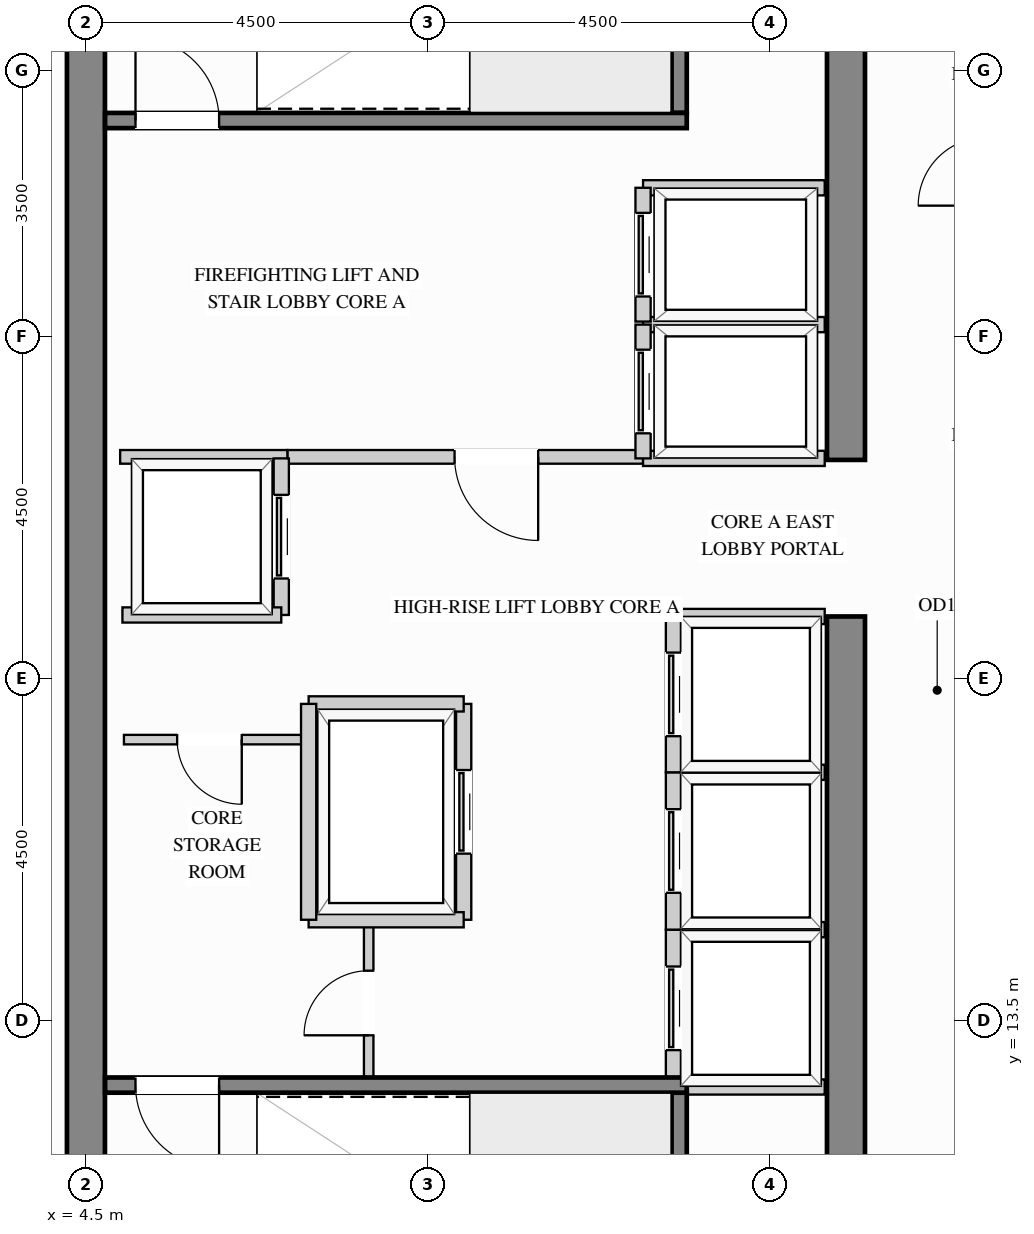
"""IFC4 building model, lengths in metres.
Left out: names, types, materials, properties, quantities, classifications, styles, units other than length and angle.
Written with IfcOpenShell. Run it as: python <this file> out.ifc"""

import sys

from ifc_helpers import new_model, si_unit, direction, frame, frame_2d, origin, place, context, subcontext, project, spatial, rectangle, extrude, source, transform, mapped, element, fill, save


model = new_model("IFC4")
c1 = context("Model", 3, precision=1e-05, world=origin(), true_north=direction((0.0, 1.0)))
c2 = subcontext(c1, "Body", "Model", "MODEL_VIEW")
j1 = project(units=[si_unit("LENGTHUNIT", "METRE"), si_unit("PLANEANGLEUNIT", "RADIAN")], contexts=[c1])
p1 = place(None, origin())
s1 = spatial("IfcSite", under=j1, at=p1, CompositionType="ELEMENT")
p2 = place(p1, origin())
s2 = spatial("IfcBuilding", under=s1, at=p2, CompositionType="ELEMENT")
p3 = place(p2, frame((0.0, 0.0, 270.0)))
s3 = spatial("IfcBuildingStorey", under=s2, at=p3, CompositionType="ELEMENT", Elevation=270.0)
m1 = source(origin(), c2, "Body", "SweptSolid", [
    extrude(rectangle(XDim=10.07, YDim=0.5, at=frame_2d((5.035, 0.0))), origin(), (0.0, 0.0, 1.0), 3.4),
])
p4 = place(p3, frame((14.5, 8.75, 0.0), z_axis=(0.0, 0.0, 1.0), x_axis=(0.0, 1.0, 0.0)))
e1 = element("IfcWall", 1, at=p4, inside=s3, PredefinedType="SHEAR", context=c2, shape_type="MappedRepresentation", body=[
    mapped(m1, transform((0.0, 0.0, 0.0), x_axis=(1.0, 0.0, 0.0), y_axis=(0.0, 1.0, 0.0), z_axis=(0.0, 0.0, 1.0))),
])
m2 = source(origin(), c2, "Body", "SweptSolid", [
    extrude(rectangle(XDim=8.37, YDim=0.5, at=frame_2d((4.185, 0.0))), origin(), (0.0, 0.0, 1.0), 3.4),
])
p5 = place(p3, frame((14.5, 20.88, 0.0), z_axis=(0.0, 0.0, 1.0), x_axis=(0.0, 1.0, 0.0)))
e2 = element("IfcWall", 2, at=p5, inside=s3, PredefinedType="SHEAR", context=c2, shape_type="MappedRepresentation", body=[
    mapped(m2, transform((0.0, 0.0, 0.0), x_axis=(1.0, 0.0, 0.0), y_axis=(0.0, 1.0, 0.0), z_axis=(0.0, 0.0, 1.0))),
])
m3 = source(origin(), c2, "Body", "SweptSolid", [
    extrude(rectangle(XDim=20.5, YDim=0.5, at=frame_2d((10.25, 0.0))), origin(), (0.0, 0.0, 1.0), 3.4),
])
p6 = place(p3, frame((4.5, 8.75, 0.0), z_axis=(0.0, 0.0, 1.0), x_axis=(0.0, 1.0, 0.0)))
e3 = element("IfcWall", 3, at=p6, inside=s3, PredefinedType="SHEAR", context=c2, shape_type="MappedRepresentation", body=[
    mapped(m3, transform((0.0, 0.0, 0.0), x_axis=(1.0, 0.0, 0.0), y_axis=(0.0, 1.0, 0.0), z_axis=(0.0, 0.0, 1.0))),
])
p7 = place(p3, frame((7.15, 20.92, 0.0), z_axis=(0.0, 0.0, 1.0), x_axis=(1.0, 0.0, 0.0)))
e4 = element("IfcWall", 4, at=p7, inside=s3, PredefinedType="PARTITIONING", context=c2, shape_type="SweptSolid", body=[
    extrude(rectangle(XDim=4.68, YDim=0.18, at=frame_2d((2.34, 0.0))), origin(), (0.0, 0.0, 1.0), 3.385),
])
p8 = place(p7, frame((2.2, 0.0, 0.0)))
e5 = element("IfcOpeningElement", 5, at=p8, cuts=e4, PredefinedType="OPENING", context=c2, shape_type="SweptSolid", body=[
    extrude(rectangle(XDim=1.1, YDim=2.15, at=frame_2d((0.55, 1.075))), frame((0.0, 0.1, 0.0), z_axis=(0.0, -1.0, 0.0), x_axis=(1.0, 0.0, 0.0)), (0.0, 0.0, 1.0), 0.2),
])
m4 = source(origin(), c2, "Body", "SweptSolid", [
    extrude(rectangle(XDim=2.2, YDim=0.18, at=frame_2d((1.1, 0.0))), origin(), (0.0, 0.0, 1.0), 3.385),
])
p9 = place(p3, frame((4.95, 20.92, 0.0), z_axis=(0.0, 0.0, 1.0), x_axis=(1.0, 0.0, 0.0)))
e6 = element("IfcWall", 6, at=p9, inside=s3, PredefinedType="PARTITIONING", context=c2, shape_type="MappedRepresentation", body=[
    mapped(m4, transform((0.0, 0.0, 0.0), x_axis=(1.0, 0.0, 0.0), y_axis=(0.0, 1.0, 0.0), z_axis=(0.0, 0.0, 1.0))),
])
p10 = place(p3, frame((8.22, 12.75, 0.0), z_axis=(0.0, 0.0, 1.0), x_axis=(0.0, 1.0, 0.0)))
e7 = element("IfcWall", 7, at=p10, inside=s3, PredefinedType="PARTITIONING", context=c2, shape_type="SweptSolid", body=[
    extrude(rectangle(XDim=2.07, YDim=0.125, at=frame_2d((1.035, 0.0))), origin(), (0.0, 0.0, 1.0), 3.385),
])
p11 = place(p10, frame((0.56, 0.0, 0.0)))
e8 = element("IfcOpeningElement", 8, at=p11, cuts=e7, PredefinedType="OPENING", context=c2, shape_type="SweptSolid", body=[
    extrude(rectangle(XDim=0.85, YDim=2.1, at=frame_2d((0.425, 1.05))), frame((0.0, 0.073, 0.0), z_axis=(0.0, -1.0, 0.0), x_axis=(1.0, 0.0, 0.0)), (0.0, 0.0, 1.0), 0.145),
])
p12 = place(p3, frame((5.0, 17.2, 0.0), z_axis=(0.0, 0.0, 1.0), x_axis=(1.0, 0.0, 0.0)))
e9 = element("IfcWall", 9, at=p12, inside=s3, PredefinedType="PARTITIONING", context=c2, shape_type="SweptSolid", body=[
    extrude(rectangle(XDim=2.4, YDim=0.125, at=frame_2d((1.2, 0.0))), origin(), (0.0, 0.0, 1.0), 3.385),
])
p13 = place(p12, frame((0.7, 0.0, 0.0)))
e10 = element("IfcOpeningElement", 10, at=p13, cuts=e9, PredefinedType="OPENING", context=c2, shape_type="SweptSolid", body=[
    extrude(rectangle(XDim=0.85, YDim=2.1, at=frame_2d((0.425, 1.05))), frame((0.0, 0.073, 0.0), z_axis=(0.0, -1.0, 0.0), x_axis=(1.0, 0.0, 0.0)), (0.0, 0.0, 1.0), 0.145),
])
m5 = source(origin(), c2, "Body", "SweptSolid", [
    extrude(rectangle(XDim=2.39, YDim=0.2, at=frame_2d((1.195, 0.0))), origin(), (0.0, 0.0, 1.0), 3.385),
])
for number, where, z_axis, x_axis in (
    (11, (11.83, 22.66, 0.0), (0.0, 0.0, 1.0), (1.0, 0.0, 0.0)),
    (12, (11.83, 20.9, 0.0), (0.0, 0.0, 1.0), (1.0, 0.0, 0.0)),
):
    element("IfcWall", number, at=place(p3, frame(where, z_axis=z_axis, x_axis=x_axis)), inside=s3, PredefinedType="PARTITIONING", context=c2, shape_type="MappedRepresentation", body=[
        mapped(m5, transform((0.0, 0.0, 0.0), x_axis=(1.0, 0.0, 0.0), y_axis=(0.0, 1.0, 0.0), z_axis=(0.0, 0.0, 1.0))),
    ])
p14 = place(p3, frame((11.83, 20.9, 0.0), z_axis=(0.0, 0.0, 1.0), x_axis=(0.0, 1.0, 0.0)))
e13 = element("IfcWall", 13, at=p14, inside=s3, PredefinedType="PARTITIONING", context=c2, shape_type="SweptSolid", body=[
    extrude(rectangle(XDim=1.76, YDim=0.2, at=frame_2d((0.88, 0.0))), origin(), (0.0, 0.0, 1.0), 3.385),
])
p15 = place(p14, frame((0.33, 0.0, 0.0)))
e14 = element("IfcOpeningElement", 14, at=p15, cuts=e13, PredefinedType="OPENING", context=c2, shape_type="SweptSolid", body=[
    extrude(rectangle(XDim=1.1, YDim=2.2, at=frame_2d((0.55, 1.1))), frame((0.0, 0.11, 0.0), z_axis=(0.0, -1.0, 0.0), x_axis=(1.0, 0.0, 0.0)), (0.0, 0.0, 1.0), 0.22),
])
p16 = place(p3, frame((11.83, 24.46, 0.0), z_axis=(0.0, 0.0, 1.0), x_axis=(1.0, 0.0, 0.0)))
e15 = element("IfcWall", 15, at=p16, inside=s3, PredefinedType="PARTITIONING", context=c2, shape_type="MappedRepresentation", body=[
    mapped(m5, transform((0.0, 0.0, 0.0), x_axis=(1.0, 0.0, 0.0), y_axis=(0.0, 1.0, 0.0), z_axis=(0.0, 0.0, 1.0))),
])
p17 = place(p3, frame((11.83, 22.7, 0.0), z_axis=(0.0, 0.0, 1.0), x_axis=(0.0, 1.0, 0.0)))
e16 = element("IfcWall", 16, at=p17, inside=s3, PredefinedType="PARTITIONING", context=c2, shape_type="SweptSolid", body=[
    extrude(rectangle(XDim=1.76, YDim=0.2, at=frame_2d((0.88, 0.0))), origin(), (0.0, 0.0, 1.0), 3.385),
])
p18 = place(p17, frame((0.33, 0.0, 0.0)))
e17 = element("IfcOpeningElement", 17, at=p18, cuts=e16, PredefinedType="OPENING", context=c2, shape_type="SweptSolid", body=[
    extrude(rectangle(XDim=1.1, YDim=2.2, at=frame_2d((0.55, 1.1))), frame((0.0, 0.11, 0.0), z_axis=(0.0, -1.0, 0.0), x_axis=(1.0, 0.0, 0.0)), (0.0, 0.0, 1.0), 0.22),
])
m6 = source(origin(), c2, "Body", "SweptSolid", [
    extrude(rectangle(XDim=1.99, YDim=0.2, at=frame_2d((0.995, 0.0))), origin(), (0.0, 0.0, 1.0), 3.385),
])
for number, where, z_axis, x_axis in (
    (18, (12.23, 14.7, 0.0), (0.0, 0.0, 1.0), (1.0, 0.0, 0.0)),
    (19, (12.23, 12.63, 0.0), (0.0, 0.0, 1.0), (1.0, 0.0, 0.0)),
):
    element("IfcWall", number, at=place(p3, frame(where, z_axis=z_axis, x_axis=x_axis)), inside=s3, PredefinedType="PARTITIONING", context=c2, shape_type="MappedRepresentation", body=[
        mapped(m6, transform((0.0, 0.0, 0.0), x_axis=(1.0, 0.0, 0.0), y_axis=(0.0, 1.0, 0.0), z_axis=(0.0, 0.0, 1.0))),
    ])
p19 = place(p3, frame((12.23, 12.63, 0.0), z_axis=(0.0, 0.0, 1.0), x_axis=(0.0, 1.0, 0.0)))
e20 = element("IfcWall", 20, at=p19, inside=s3, PredefinedType="PARTITIONING", context=c2, shape_type="SweptSolid", body=[
    extrude(rectangle(XDim=2.07, YDim=0.2, at=frame_2d((1.035, 0.0))), origin(), (0.0, 0.0, 1.0), 3.385),
])
p20 = place(p19, frame((0.485, 0.0, 0.0)))
e21 = element("IfcOpeningElement", 21, at=p20, cuts=e20, PredefinedType="OPENING", context=c2, shape_type="SweptSolid", body=[
    extrude(rectangle(XDim=1.1, YDim=2.2, at=frame_2d((0.55, 1.1))), frame((0.0, 0.11, 0.0), z_axis=(0.0, -1.0, 0.0), x_axis=(1.0, 0.0, 0.0)), (0.0, 0.0, 1.0), 0.22),
])
p21 = place(p3, frame((12.23, 16.77, 0.0), z_axis=(0.0, 0.0, 1.0), x_axis=(1.0, 0.0, 0.0)))
e22 = element("IfcWall", 22, at=p21, inside=s3, PredefinedType="PARTITIONING", context=c2, shape_type="MappedRepresentation", body=[
    mapped(m6, transform((0.0, 0.0, 0.0), x_axis=(1.0, 0.0, 0.0), y_axis=(0.0, 1.0, 0.0), z_axis=(0.0, 0.0, 1.0))),
])
p22 = place(p3, frame((12.23, 14.7, 0.0), z_axis=(0.0, 0.0, 1.0), x_axis=(0.0, 1.0, 0.0)))
e23 = element("IfcWall", 23, at=p22, inside=s3, PredefinedType="PARTITIONING", context=c2, shape_type="SweptSolid", body=[
    extrude(rectangle(XDim=2.07, YDim=0.2, at=frame_2d((1.035, 0.0))), origin(), (0.0, 0.0, 1.0), 3.385),
])
p23 = place(p22, frame((0.485, 0.0, 0.0)))
e24 = element("IfcOpeningElement", 24, at=p23, cuts=e23, PredefinedType="OPENING", context=c2, shape_type="SweptSolid", body=[
    extrude(rectangle(XDim=1.1, YDim=2.2, at=frame_2d((0.55, 1.1))), frame((0.0, 0.11, 0.0), z_axis=(0.0, -1.0, 0.0), x_axis=(1.0, 0.0, 0.0)), (0.0, 0.0, 1.0), 0.22),
])
p24 = place(p3, frame((12.23, 18.82, 0.0), z_axis=(0.0, 0.0, 1.0), x_axis=(1.0, 0.0, 0.0)))
e25 = element("IfcWall", 25, at=p24, inside=s3, PredefinedType="PARTITIONING", context=c2, shape_type="MappedRepresentation", body=[
    mapped(m6, transform((0.0, 0.0, 0.0), x_axis=(1.0, 0.0, 0.0), y_axis=(0.0, 1.0, 0.0), z_axis=(0.0, 0.0, 1.0))),
])
p25 = place(p3, frame((12.23, 16.77, 0.0), z_axis=(0.0, 0.0, 1.0), x_axis=(0.0, 1.0, 0.0)))
e26 = element("IfcWall", 26, at=p25, inside=s3, PredefinedType="PARTITIONING", context=c2, shape_type="SweptSolid", body=[
    extrude(rectangle(XDim=2.05, YDim=0.2, at=frame_2d((1.025, 0.0))), origin(), (0.0, 0.0, 1.0), 3.385),
])
p26 = place(p25, frame((0.475, 0.0, 0.0)))
e27 = element("IfcOpeningElement", 27, at=p26, cuts=e26, PredefinedType="OPENING", context=c2, shape_type="SweptSolid", body=[
    extrude(rectangle(XDim=1.1, YDim=2.2, at=frame_2d((0.55, 1.1))), frame((0.0, 0.11, 0.0), z_axis=(0.0, -1.0, 0.0), x_axis=(1.0, 0.0, 0.0)), (0.0, 0.0, 1.0), 0.22),
])
p27 = place(p3, frame((7.07, 18.84, 0.0), z_axis=(0.0, 0.0, 1.0), x_axis=(0.0, 1.0, 0.0)))
e28 = element("IfcWall", 28, at=p27, inside=s3, PredefinedType="PARTITIONING", context=c2, shape_type="SweptSolid", body=[
    extrude(rectangle(XDim=2.06, YDim=0.2, at=frame_2d((1.03, 0.0))), origin(), (0.0, 0.0, 1.0), 3.385),
])
p28 = place(p27, frame((0.48, 0.0, 0.0)))
e29 = element("IfcOpeningElement", 29, at=p28, cuts=e28, PredefinedType="OPENING", context=c2, shape_type="SweptSolid", body=[
    extrude(rectangle(XDim=1.1, YDim=2.2, at=frame_2d((0.55, 1.1))), frame((0.0, 0.11, 0.0), z_axis=(0.0, -1.0, 0.0), x_axis=(1.0, 0.0, 0.0)), (0.0, 0.0, 1.0), 0.22),
])
m7 = source(origin(), c2, "Body", "SweptSolid", [
    extrude(rectangle(XDim=2.09, YDim=0.2, at=frame_2d((1.045, 0.0))), origin(), (0.0, 0.0, 1.0), 3.385),
])
p29 = place(p3, frame((4.98, 18.84, 0.0), z_axis=(0.0, 0.0, 1.0), x_axis=(1.0, 0.0, 0.0)))
e30 = element("IfcWall", 30, at=p29, inside=s3, PredefinedType="PARTITIONING", context=c2, shape_type="MappedRepresentation", body=[
    mapped(m7, transform((0.0, 0.0, 0.0), x_axis=(1.0, 0.0, 0.0), y_axis=(0.0, 1.0, 0.0), z_axis=(0.0, 0.0, 1.0))),
])
p30 = place(p3, frame((9.47, 14.83, 0.0), z_axis=(0.0, 0.0, 1.0), x_axis=(0.0, 1.0, 0.0)))
e31 = element("IfcWall", 31, at=p30, inside=s3, PredefinedType="PARTITIONING", context=c2, shape_type="SweptSolid", body=[
    extrude(rectangle(XDim=2.84, YDim=0.2, at=frame_2d((1.42, 0.0))), origin(), (0.0, 0.0, 1.0), 3.385),
])
p31 = place(p30, frame((0.87, 0.0, 0.0)))
e32 = element("IfcOpeningElement", 32, at=p31, cuts=e31, PredefinedType="OPENING", context=c2, shape_type="SweptSolid", body=[
    extrude(rectangle(XDim=1.1, YDim=2.2, at=frame_2d((0.55, 1.1))), frame((0.0, 0.11, 0.0), z_axis=(0.0, -1.0, 0.0), x_axis=(1.0, 0.0, 0.0)), (0.0, 0.0, 1.0), 0.22),
])
m8 = source(origin(), c2, "Body", "SweptSolid", [
    extrude(rectangle(XDim=2.04, YDim=0.2, at=frame_2d((1.02, 0.0))), origin(), (0.0, 0.0, 1.0), 3.385),
])
for number, where, z_axis, x_axis in (
    (33, (7.43, 17.67, 0.0), (0.0, 0.0, 1.0), (1.0, 0.0, 0.0)),
    (34, (7.43, 14.83, 0.0), (0.0, 0.0, 1.0), (1.0, 0.0, 0.0)),
):
    element("IfcWall", number, at=place(p3, frame(where, z_axis=z_axis, x_axis=x_axis)), inside=s3, PredefinedType="PARTITIONING", context=c2, shape_type="MappedRepresentation", body=[
        mapped(m8, transform((0.0, 0.0, 0.0), x_axis=(1.0, 0.0, 0.0), y_axis=(0.0, 1.0, 0.0), z_axis=(0.0, 0.0, 1.0))),
    ])
m9 = source(origin(), c2, "Body", "SweptSolid", [
    extrude(rectangle(XDim=2.84, YDim=0.2, at=frame_2d((1.42, 0.0))), origin(), (0.0, 0.0, 1.0), 3.385),
])
p32 = place(p3, frame((7.43, 14.83, 0.0), z_axis=(0.0, 0.0, 1.0), x_axis=(0.0, 1.0, 0.0)))
e35 = element("IfcWall", 35, at=p32, inside=s3, PredefinedType="PARTITIONING", context=c2, shape_type="MappedRepresentation", body=[
    mapped(m9, transform((0.0, 0.0, 0.0), x_axis=(1.0, 0.0, 0.0), y_axis=(0.0, 1.0, 0.0), z_axis=(0.0, 0.0, 1.0))),
])
m10 = source(origin(), c2, "Body", "SweptSolid", [
    extrude(rectangle(XDim=3.803, YDim=0.2, at=frame_2d((1.901, 0.0))), origin(), (0.0, 0.0, 1.0), 3.4),
])
p33 = place(p3, frame((12.305, 8.752, 0.0), z_axis=(0.0, 0.0, 1.0), x_axis=(0.0, 1.0, 0.0)))
e36 = element("IfcWall", 36, at=p33, inside=s3, PredefinedType="SHEAR", context=c2, shape_type="MappedRepresentation", body=[
    mapped(m10, transform((0.0, 0.0, 0.0), x_axis=(1.0, 0.0, 0.0), y_axis=(0.0, 1.0, 0.0), z_axis=(0.0, 0.0, 1.0))),
])
p34 = place(p3, frame((4.752, 12.655, 0.0), z_axis=(0.0, 0.0, 1.0), x_axis=(1.0, 0.0, 0.0)))
e37 = element("IfcWall", 37, at=p34, inside=s3, PredefinedType="SHEAR", context=c2, shape_type="SweptSolid", body=[
    extrude(rectangle(XDim=7.653, YDim=0.2, at=frame_2d((3.827, 0.0))), origin(), (0.0, 0.0, 1.0), 3.4),
])
p35 = place(p34, frame((0.4, 0.0, 0.0)))
e38 = element("IfcOpeningElement", 38, at=p35, cuts=e37, PredefinedType="OPENING", context=c2, shape_type="SweptSolid", body=[
    extrude(rectangle(XDim=1.1, YDim=2.15, at=frame_2d((0.55, 1.075))), frame((0.0, 0.11, 0.0), z_axis=(0.0, -1.0, 0.0), x_axis=(1.0, 0.0, 0.0)), (0.0, 0.0, 1.0), 0.22),
])
p36 = place(p3, frame((12.305, 25.445, 0.0), z_axis=(0.0, 0.0, 1.0), x_axis=(0.0, 1.0, 0.0)))
e39 = element("IfcWall", 39, at=p36, inside=s3, PredefinedType="SHEAR", context=c2, shape_type="MappedRepresentation", body=[
    mapped(m10, transform((0.0, 0.0, 0.0), x_axis=(1.0, 0.0, 0.0), y_axis=(0.0, 1.0, 0.0), z_axis=(0.0, 0.0, 1.0))),
])
p37 = place(p3, frame((4.752, 25.345, 0.0), z_axis=(0.0, 0.0, 1.0), x_axis=(1.0, 0.0, 0.0)))
e40 = element("IfcWall", 40, at=p37, inside=s3, PredefinedType="SHEAR", context=c2, shape_type="SweptSolid", body=[
    extrude(rectangle(XDim=7.653, YDim=0.2, at=frame_2d((3.827, 0.0))), origin(), (0.0, 0.0, 1.0), 3.4),
])
p38 = place(p37, frame((0.4, 0.0, 0.0)))
e41 = element("IfcOpeningElement", 41, at=p38, cuts=e40, PredefinedType="OPENING", context=c2, shape_type="SweptSolid", body=[
    extrude(rectangle(XDim=1.1, YDim=2.15, at=frame_2d((0.55, 1.075))), frame((0.0, 0.11, 0.0), z_axis=(0.0, -1.0, 0.0), x_axis=(1.0, 0.0, 0.0)), (0.0, 0.0, 1.0), 0.22),
])
m11 = source(origin(), c2, "Body", "SweptSolid", [
    extrude(rectangle(XDim=1.1, YDim=2.15, at=frame_2d((0.55, 1.075))), frame((0.0, 0.025, 0.0), z_axis=(0.0, -1.0, 0.0), x_axis=(1.0, 0.0, 0.0)), (0.0, 0.0, 1.0), 0.05),
])
p39 = place(p8, origin())
e42 = element("IfcDoor", 42, at=p39, inside=s3, OperationType="SINGLE_SWING_RIGHT", PredefinedType="DOOR", context=c2, shape_type="MappedRepresentation", body=[
    mapped(m11, transform((0.0, 0.0, 0.0), x_axis=(1.0, 0.0, 0.0), y_axis=(0.0, 1.0, 0.0), z_axis=(0.0, 0.0, 1.0))),
])
fill(e5, e42)
m12 = source(origin(), c2, "Body", "SweptSolid", [
    extrude(rectangle(XDim=1.1, YDim=2.2, at=frame_2d((0.55, 1.1))), frame((0.0, 0.025, 0.0), z_axis=(0.0, -1.0, 0.0), x_axis=(1.0, 0.0, 0.0)), (0.0, 0.0, 1.0), 0.05),
])
p40 = place(p15, origin())
e43 = element("IfcDoor", 43, at=p40, inside=s3, OperationType="SLIDING_TO_LEFT", PredefinedType="DOOR", context=c2, shape_type="MappedRepresentation", body=[
    mapped(m12, transform((0.0, 0.0, 0.0), x_axis=(1.0, 0.0, 0.0), y_axis=(0.0, 1.0, 0.0), z_axis=(0.0, 0.0, 1.0))),
])
fill(e14, e43)
p41 = place(p18, origin())
e44 = element("IfcDoor", 44, at=p41, inside=s3, OperationType="SLIDING_TO_LEFT", PredefinedType="DOOR", context=c2, shape_type="MappedRepresentation", body=[
    mapped(m12, transform((0.0, 0.0, 0.0), x_axis=(1.0, 0.0, 0.0), y_axis=(0.0, 1.0, 0.0), z_axis=(0.0, 0.0, 1.0))),
])
fill(e17, e44)
p42 = place(p20, origin())
e45 = element("IfcDoor", 45, at=p42, inside=s3, OperationType="SLIDING_TO_LEFT", PredefinedType="DOOR", context=c2, shape_type="MappedRepresentation", body=[
    mapped(m12, transform((0.0, 0.0, 0.0), x_axis=(1.0, 0.0, 0.0), y_axis=(0.0, 1.0, 0.0), z_axis=(0.0, 0.0, 1.0))),
])
fill(e21, e45)
p43 = place(p23, origin())
e46 = element("IfcDoor", 46, at=p43, inside=s3, OperationType="SLIDING_TO_LEFT", PredefinedType="DOOR", context=c2, shape_type="MappedRepresentation", body=[
    mapped(m12, transform((0.0, 0.0, 0.0), x_axis=(1.0, 0.0, 0.0), y_axis=(0.0, 1.0, 0.0), z_axis=(0.0, 0.0, 1.0))),
])
fill(e24, e46)
p44 = place(p26, origin())
e47 = element("IfcDoor", 47, at=p44, inside=s3, OperationType="SLIDING_TO_LEFT", PredefinedType="DOOR", context=c2, shape_type="MappedRepresentation", body=[
    mapped(m12, transform((0.0, 0.0, 0.0), x_axis=(1.0, 0.0, 0.0), y_axis=(0.0, 1.0, 0.0), z_axis=(0.0, 0.0, 1.0))),
])
fill(e27, e47)
p45 = place(p28, origin())
e48 = element("IfcDoor", 48, at=p45, inside=s3, OperationType="SLIDING_TO_LEFT", PredefinedType="DOOR", context=c2, shape_type="MappedRepresentation", body=[
    mapped(m12, transform((0.0, 0.0, 0.0), x_axis=(1.0, 0.0, 0.0), y_axis=(0.0, 1.0, 0.0), z_axis=(0.0, 0.0, 1.0))),
])
fill(e29, e48)
p46 = place(p31, origin())
e49 = element("IfcDoor", 49, at=p46, inside=s3, OperationType="SLIDING_TO_LEFT", PredefinedType="DOOR", context=c2, shape_type="MappedRepresentation", body=[
    mapped(m12, transform((0.0, 0.0, 0.0), x_axis=(1.0, 0.0, 0.0), y_axis=(0.0, 1.0, 0.0), z_axis=(0.0, 0.0, 1.0))),
])
fill(e32, e49)
m13 = source(origin(), c2, "Body", "SweptSolid", [
    extrude(rectangle(XDim=0.85, YDim=2.1, at=frame_2d((0.425, 1.05))), frame((0.0, 0.025, 0.0), z_axis=(0.0, -1.0, 0.0), x_axis=(1.0, 0.0, 0.0)), (0.0, 0.0, 1.0), 0.05),
])
p47 = place(p13, origin())
e50 = element("IfcDoor", 50, at=p47, inside=s3, OperationType="SINGLE_SWING_RIGHT", PredefinedType="DOOR", context=c2, shape_type="MappedRepresentation", body=[
    mapped(m13, transform((0.0, 0.0, 0.0), x_axis=(1.0, 0.0, 0.0), y_axis=(0.0, 1.0, 0.0), z_axis=(0.0, 0.0, 1.0))),
])
fill(e10, e50)
p48 = place(p11, origin())
e51 = element("IfcDoor", 51, at=p48, inside=s3, OperationType="SINGLE_SWING_LEFT", PredefinedType="DOOR", context=c2, shape_type="MappedRepresentation", body=[
    mapped(m13, transform((0.0, 0.0, 0.0), x_axis=(1.0, 0.0, 0.0), y_axis=(0.0, 1.0, 0.0), z_axis=(0.0, 0.0, 1.0))),
])
fill(e8, e51)
m14 = source(origin(), c2, "Body", "SweptSolid", [
    extrude(rectangle(XDim=1.1, YDim=2.15, at=frame_2d((0.55, 1.075))), frame((0.0, 0.025, 0.0), z_axis=(0.0, -1.0, 0.0), x_axis=(1.0, 0.0, 0.0)), (0.0, 0.0, 1.0), 0.05),
])
p49 = place(p35, origin())
e52 = element("IfcDoor", 52, at=p49, inside=s3, OperationType="SINGLE_SWING_RIGHT", PredefinedType="DOOR", context=c2, shape_type="MappedRepresentation", body=[
    mapped(m14, transform((0.0, 0.0, 0.0), x_axis=(1.0, 0.0, 0.0), y_axis=(0.0, 1.0, 0.0), z_axis=(0.0, 0.0, 1.0))),
])
fill(e38, e52)
p50 = place(p38, origin())
e53 = element("IfcDoor", 53, at=p50, inside=s3, OperationType="SINGLE_SWING_LEFT", PredefinedType="DOOR", context=c2, shape_type="MappedRepresentation", body=[
    mapped(m14, transform((0.0, 0.0, 0.0), x_axis=(1.0, 0.0, 0.0), y_axis=(0.0, 1.0, 0.0), z_axis=(0.0, 0.0, 1.0))),
])
fill(e41, e53)
save(model, sys.argv[1])
